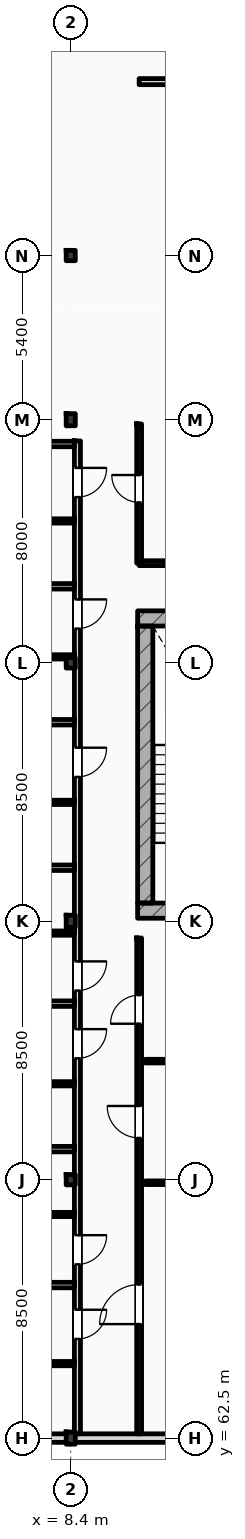
"""IFC4 building model, lengths in metres.
Left out: names, types, materials, properties, quantities, classifications, styles, units other than length and angle.
Written with IfcOpenShell. Run it as: python <this file> out.ifc"""

import sys

from ifc_helpers import new_model, si_unit, direction, frame, frame_2d, origin, origin_2d, place, context, subcontext, project, spatial, rectangle, i_section, extrude, element, fill, save


model = new_model("IFC4")
c1 = context("Model", 3, precision=1e-05, world=origin(), true_north=direction((0.0, 1.0)))
c2 = subcontext(c1, "Body", "Model", "MODEL_VIEW")
j1 = project(units=[si_unit("LENGTHUNIT", "METRE"), si_unit("PLANEANGLEUNIT", "RADIAN")], contexts=[c1])
p1 = place(None, origin())
s1 = spatial("IfcSite", under=j1, at=p1, CompositionType="ELEMENT")
p2 = place(p1, origin())
s2 = spatial("IfcBuilding", under=s1, at=p2, CompositionType="ELEMENT")
p3 = place(p2, frame((0.0, 0.0, 39.0)))
s3 = spatial("IfcBuildingStorey", under=s2, at=p3, CompositionType="ELEMENT", Elevation=39.0)
p4 = place(p3, frame((8.4, 62.5, 0.0), z_axis=(0.0, 0.0, 1.0), x_axis=(1.0, 0.0, 0.0)))
e1 = element("IfcColumn", 1, at=p4, inside=s3, PredefinedType="COLUMN", context=c2, shape_type="SweptSolid", body=[
    extrude(i_section(OverallWidth=0.3, OverallDepth=0.4, WebThickness=0.013, FlangeThickness=0.024, FilletRadius=0.027, at=origin_2d()), origin(), (0.0, 0.0, 1.0), 3.6),
])
p5 = place(p3, frame((8.4, 71.0, 0.0), z_axis=(0.0, 0.0, 1.0), x_axis=(1.0, 0.0, 0.0)))
e2 = element("IfcColumn", 2, at=p5, inside=s3, PredefinedType="COLUMN", context=c2, shape_type="SweptSolid", body=[
    extrude(i_section(OverallWidth=0.3, OverallDepth=0.34, WebThickness=0.012, FlangeThickness=0.021, FilletRadius=0.027, at=origin_2d()), origin(), (0.0, 0.0, 1.0), 3.6),
])
p6 = place(p3, frame((8.4, 79.5, 0.0), z_axis=(0.0, 0.0, 1.0), x_axis=(1.0, 0.0, 0.0)))
e3 = element("IfcColumn", 3, at=p6, inside=s3, PredefinedType="COLUMN", context=c2, shape_type="SweptSolid", body=[
    extrude(i_section(OverallWidth=0.3, OverallDepth=0.4, WebThickness=0.013, FlangeThickness=0.024, FilletRadius=0.027, at=origin_2d()), origin(), (0.0, 0.0, 1.0), 3.6),
])
p7 = place(p3, frame((8.4, 88.0, 0.0), z_axis=(0.0, 0.0, 1.0), x_axis=(1.0, 0.0, 0.0)))
e4 = element("IfcColumn", 4, at=p7, inside=s3, PredefinedType="COLUMN", context=c2, shape_type="SweptSolid", body=[
    extrude(i_section(OverallWidth=0.3, OverallDepth=0.34, WebThickness=0.012, FlangeThickness=0.021, FilletRadius=0.027, at=origin_2d()), origin(), (0.0, 0.0, 1.0), 3.6),
])
p8 = place(p3, frame((8.4, 96.0, 0.0), z_axis=(0.0, 0.0, 1.0), x_axis=(1.0, 0.0, 0.0)))
e5 = element("IfcColumn", 5, at=p8, inside=s3, PredefinedType="COLUMN", context=c2, shape_type="SweptSolid", body=[
    extrude(i_section(OverallWidth=0.3, OverallDepth=0.4, WebThickness=0.013, FlangeThickness=0.024, FilletRadius=0.027, at=origin_2d()), origin(), (0.0, 0.0, 1.0), 3.6),
])
p9 = place(p3, frame((8.4, 101.4, 0.0), z_axis=(0.0, 0.0, 1.0), x_axis=(1.0, 0.0, 0.0)))
e6 = element("IfcColumn", 6, at=p9, inside=s3, PredefinedType="COLUMN", context=c2, shape_type="SweptSolid", body=[
    extrude(i_section(OverallWidth=0.3, OverallDepth=0.34, WebThickness=0.012, FlangeThickness=0.021, FilletRadius=0.027, at=origin_2d()), origin(), (0.0, 0.0, 1.0), 3.6),
])
for number, where, z_axis, x_axis in (
    (7, (10.6, 89.462, 0.0), (0.0, 0.0, 1.0), (1.0, 0.0, 0.0)),
    (8, (10.6, 79.85, 0.0), (0.0, 0.0, 1.0), (1.0, 0.0, 0.0)),
):
    element("IfcWall", number, at=place(p3, frame(where, z_axis=z_axis, x_axis=x_axis)), inside=s3, PredefinedType="SHEAR", context=c2, shape_type="SweptSolid", body=[
        extrude(rectangle(XDim=5.16, YDim=0.5, at=frame_2d((2.58, 0.0))), origin(), (0.0, 0.0, 1.0), 3.6),
    ])
p10 = place(p3, frame((10.85, 80.1, 0.0), z_axis=(0.0, 0.0, 1.0), x_axis=(0.0, 1.0, 0.0)))
e9 = element("IfcWall", 9, at=p10, inside=s3, PredefinedType="SHEAR", context=c2, shape_type="SweptSolid", body=[
    extrude(rectangle(XDim=9.112, YDim=0.5, at=frame_2d((4.556, 0.0))), origin(), (0.0, 0.0, 1.0), 3.6),
])
p11 = place(p3, frame((0.0, 62.5, 0.0), z_axis=(0.0, 0.0, 1.0), x_axis=(1.0, 0.0, 0.0)))
e10 = element("IfcWall", 10, at=p11, inside=s3, PredefinedType="STANDARD", context=c2, shape_type="SweptSolid", body=[
    extrude(rectangle(XDim=25.2, YDim=0.28, at=frame_2d((12.6, 0.0))), origin(), (0.0, 0.0, 1.0), 2.72),
])
p12 = place(p3, frame((10.65, 107.12, 0.0), z_axis=(0.0, 0.0, 1.0), x_axis=(1.0, 0.0, 0.0)))
e11 = element("IfcWall", 11, at=p12, inside=s3, PredefinedType="PARTITIONING", context=c2, shape_type="SweptSolid", body=[
    extrude(rectangle(XDim=14.8, YDim=0.2, at=frame_2d((7.4, 0.0))), origin(), (0.0, 0.0, 1.0), 3.38),
])
p13 = place(p12, frame((8.5, 0.0, 0.0)))
e12 = element("IfcOpeningElement", 12, at=p13, cuts=e11, PredefinedType="OPENING", context=c2, shape_type="SweptSolid", body=[
    extrude(rectangle(XDim=1.25, YDim=2.15, at=frame_2d((0.625, 1.075))), frame((0.0, 0.11, 0.0), z_axis=(0.0, -1.0, 0.0), x_axis=(1.0, 0.0, 0.0)), (0.0, 0.0, 1.0), 0.22),
])
p14 = place(p3, frame((8.62, 62.64, 0.0), z_axis=(0.0, 0.0, 1.0), x_axis=(0.0, 1.0, 0.0)))
e13 = element("IfcWall", 13, at=p14, inside=s3, PredefinedType="PARTITIONING", context=c2, shape_type="SweptSolid", body=[
    extrude(rectangle(XDim=32.66, YDim=0.2, at=frame_2d((16.33, 0.0))), origin(), (0.0, 0.0, 1.0), 2.91),
])
p15 = place(p14, frame((3.122, 0.0, 0.0)))
e14 = element("IfcOpeningElement", 14, at=p15, cuts=e13, PredefinedType="OPENING", context=c2, shape_type="SweptSolid", body=[
    extrude(rectangle(XDim=0.96, YDim=2.2, at=frame_2d((0.48, 1.1))), frame((0.0, 0.11, 0.0), z_axis=(0.0, -1.0, 0.0), x_axis=(1.0, 0.0, 0.0)), (0.0, 0.0, 1.0), 0.22),
])
p16 = place(p14, frame((5.575, 0.0, 0.0)))
e15 = element("IfcOpeningElement", 15, at=p16, cuts=e13, PredefinedType="OPENING", context=c2, shape_type="SweptSolid", body=[
    extrude(rectangle(XDim=0.96, YDim=2.2, at=frame_2d((0.48, 1.1))), frame((0.0, 0.11, 0.0), z_axis=(0.0, -1.0, 0.0), x_axis=(1.0, 0.0, 0.0)), (0.0, 0.0, 1.0), 0.22),
])
p17 = place(p14, frame((12.353, 0.0, 0.0)))
e16 = element("IfcOpeningElement", 16, at=p17, cuts=e13, PredefinedType="OPENING", context=c2, shape_type="SweptSolid", body=[
    extrude(rectangle(XDim=0.96, YDim=2.2, at=frame_2d((0.48, 1.1))), frame((0.0, 0.11, 0.0), z_axis=(0.0, -1.0, 0.0), x_axis=(1.0, 0.0, 0.0)), (0.0, 0.0, 1.0), 0.22),
])
p18 = place(p14, frame((14.581, 0.0, 0.0)))
e17 = element("IfcOpeningElement", 17, at=p18, cuts=e13, PredefinedType="OPENING", context=c2, shape_type="SweptSolid", body=[
    extrude(rectangle(XDim=0.96, YDim=2.2, at=frame_2d((0.48, 1.1))), frame((0.0, 0.11, 0.0), z_axis=(0.0, -1.0, 0.0), x_axis=(1.0, 0.0, 0.0)), (0.0, 0.0, 1.0), 0.22),
])
p19 = place(p14, frame((21.61, 0.0, 0.0)))
e18 = element("IfcOpeningElement", 18, at=p19, cuts=e13, PredefinedType="OPENING", context=c2, shape_type="SweptSolid", body=[
    extrude(rectangle(XDim=0.96, YDim=2.2, at=frame_2d((0.48, 1.1))), frame((0.0, 0.11, 0.0), z_axis=(0.0, -1.0, 0.0), x_axis=(1.0, 0.0, 0.0)), (0.0, 0.0, 1.0), 0.22),
])
p20 = place(p14, frame((26.488, 0.0, 0.0)))
e19 = element("IfcOpeningElement", 19, at=p20, cuts=e13, PredefinedType="OPENING", context=c2, shape_type="SweptSolid", body=[
    extrude(rectangle(XDim=0.96, YDim=2.2, at=frame_2d((0.48, 1.1))), frame((0.0, 0.11, 0.0), z_axis=(0.0, -1.0, 0.0), x_axis=(1.0, 0.0, 0.0)), (0.0, 0.0, 1.0), 0.22),
])
p21 = place(p14, frame((30.814, 0.0, 0.0)))
e20 = element("IfcOpeningElement", 20, at=p21, cuts=e13, PredefinedType="OPENING", context=c2, shape_type="SweptSolid", body=[
    extrude(rectangle(XDim=0.96, YDim=2.2, at=frame_2d((0.48, 1.1))), frame((0.0, 0.11, 0.0), z_axis=(0.0, -1.0, 0.0), x_axis=(1.0, 0.0, 0.0)), (0.0, 0.0, 1.0), 0.22),
])
p22 = place(p3, frame((10.65, 62.64, 0.0), z_axis=(0.0, 0.0, 1.0), x_axis=(0.0, 1.0, 0.0)))
e21 = element("IfcWall", 21, at=p22, inside=s3, PredefinedType="PARTITIONING", context=c2, shape_type="SweptSolid", body=[
    extrude(rectangle(XDim=16.31, YDim=0.16, at=frame_2d((8.155, 0.0))), origin(), (0.0, 0.0, 1.0), 3.38),
])
p23 = place(p22, frame((3.61, 0.0, 0.0)))
e22 = element("IfcOpeningElement", 22, at=p23, cuts=e21, PredefinedType="OPENING", context=c2, shape_type="SweptSolid", body=[
    extrude(rectangle(XDim=1.3, YDim=2.2, at=frame_2d((0.65, 1.1))), frame((0.0, 0.09, 0.0), z_axis=(0.0, -1.0, 0.0), x_axis=(1.0, 0.0, 0.0)), (0.0, 0.0, 1.0), 0.18),
])
p24 = place(p22, frame((9.735, 0.0, 0.0)))
e23 = element("IfcOpeningElement", 23, at=p24, cuts=e21, PredefinedType="OPENING", context=c2, shape_type="SweptSolid", body=[
    extrude(rectangle(XDim=1.05, YDim=2.12, at=frame_2d((0.525, 1.06))), frame((0.0, 0.09, 0.0), z_axis=(0.0, -1.0, 0.0), x_axis=(1.0, 0.0, 0.0)), (0.0, 0.0, 1.0), 0.18),
])
p25 = place(p22, frame((13.49, 0.0, 0.0)))
e24 = element("IfcOpeningElement", 24, at=p25, cuts=e21, PredefinedType="OPENING", context=c2, shape_type="SweptSolid", body=[
    extrude(rectangle(XDim=0.94, YDim=2.15, at=frame_2d((0.47, 1.075))), frame((0.0, 0.09, 0.0), z_axis=(0.0, -1.0, 0.0), x_axis=(1.0, 0.0, 0.0)), (0.0, 0.0, 1.0), 0.18),
])
p26 = place(p3, frame((10.65, 91.28, 0.0), z_axis=(0.0, 0.0, 1.0), x_axis=(0.0, 1.0, 0.0)))
e25 = element("IfcWall", 25, at=p26, inside=s3, PredefinedType="PARTITIONING", context=c2, shape_type="SweptSolid", body=[
    extrude(rectangle(XDim=4.58, YDim=0.16, at=frame_2d((2.29, 0.0))), origin(), (0.0, 0.0, 1.0), 3.38),
])
p27 = place(p26, frame((2.0, 0.0, 0.0)))
e26 = element("IfcOpeningElement", 26, at=p27, cuts=e25, PredefinedType="OPENING", context=c2, shape_type="SweptSolid", body=[
    extrude(rectangle(XDim=0.9, YDim=2.1, at=frame_2d((0.45, 1.05))), frame((0.0, 0.09, 0.0), z_axis=(0.0, -1.0, 0.0), x_axis=(1.0, 0.0, 0.0)), (0.0, 0.0, 1.0), 0.18),
])
p28 = place(p3, frame((10.65, 91.28, 0.0), z_axis=(0.0, 0.0, 1.0), x_axis=(1.0, 0.0, 0.0)))
e27 = element("IfcWall", 27, at=p28, inside=s3, PredefinedType="PARTITIONING", context=c2, shape_type="SweptSolid", body=[
    extrude(rectangle(XDim=6.9, YDim=0.16, at=frame_2d((3.45, 0.0))), origin(), (0.0, 0.0, 1.0), 3.38),
])
p29 = place(p3, frame((0.15, 67.534, 0.0), z_axis=(0.0, 0.0, 1.0), x_axis=(1.0, 0.0, 0.0)))
e28 = element("IfcWall", 28, at=p29, inside=s3, PredefinedType="PARTITIONING", context=c2, shape_type="SweptSolid", body=[
    extrude(rectangle(XDim=8.37, YDim=0.18, at=frame_2d((4.185, 0.0))), origin(), (0.0, 0.0, 1.0), 3.38),
])
p30 = place(p3, frame((5.05, 64.95, 0.0), z_axis=(0.0, 0.0, 1.0), x_axis=(1.0, 0.0, 0.0)))
e29 = element("IfcWall", 29, at=p30, inside=s3, PredefinedType="PARTITIONING", context=c2, shape_type="SweptSolid", body=[
    extrude(rectangle(XDim=3.47, YDim=0.14, at=frame_2d((1.735, 0.0))), origin(), (0.0, 0.0, 1.0), 3.38),
])
p31 = place(p3, frame((0.15, 72.005, 0.0), z_axis=(0.0, 0.0, 1.0), x_axis=(1.0, 0.0, 0.0)))
e30 = element("IfcWall", 30, at=p31, inside=s3, PredefinedType="PARTITIONING", context=c2, shape_type="SweptSolid", body=[
    extrude(rectangle(XDim=8.37, YDim=0.18, at=frame_2d((4.185, 0.0))), origin(), (0.0, 0.0, 1.0), 3.38),
])
p32 = place(p3, frame((5.05, 69.855, 0.0), z_axis=(0.0, 0.0, 1.0), x_axis=(1.0, 0.0, 0.0)))
e31 = element("IfcWall", 31, at=p32, inside=s3, PredefinedType="PARTITIONING", context=c2, shape_type="SweptSolid", body=[
    extrude(rectangle(XDim=3.47, YDim=0.14, at=frame_2d((1.735, 0.0))), origin(), (0.0, 0.0, 1.0), 3.38),
])
p33 = place(p3, frame((0.15, 76.791, 0.0), z_axis=(0.0, 0.0, 1.0), x_axis=(1.0, 0.0, 0.0)))
e32 = element("IfcWall", 32, at=p33, inside=s3, PredefinedType="PARTITIONING", context=c2, shape_type="SweptSolid", body=[
    extrude(rectangle(XDim=8.37, YDim=0.18, at=frame_2d((4.185, 0.0))), origin(), (0.0, 0.0, 1.0), 3.38),
])
p34 = place(p3, frame((5.05, 74.155, 0.0), z_axis=(0.0, 0.0, 1.0), x_axis=(1.0, 0.0, 0.0)))
e33 = element("IfcWall", 33, at=p34, inside=s3, PredefinedType="PARTITIONING", context=c2, shape_type="SweptSolid", body=[
    extrude(rectangle(XDim=3.47, YDim=0.14, at=frame_2d((1.735, 0.0))), origin(), (0.0, 0.0, 1.0), 3.38),
])
p35 = place(p3, frame((0.15, 81.262, 0.0), z_axis=(0.0, 0.0, 1.0), x_axis=(1.0, 0.0, 0.0)))
e34 = element("IfcWall", 34, at=p35, inside=s3, PredefinedType="PARTITIONING", context=c2, shape_type="SweptSolid", body=[
    extrude(rectangle(XDim=8.37, YDim=0.18, at=frame_2d((4.185, 0.0))), origin(), (0.0, 0.0, 1.0), 3.38),
])
p36 = place(p3, frame((5.05, 79.112, 0.0), z_axis=(0.0, 0.0, 1.0), x_axis=(1.0, 0.0, 0.0)))
e35 = element("IfcWall", 35, at=p36, inside=s3, PredefinedType="PARTITIONING", context=c2, shape_type="SweptSolid", body=[
    extrude(rectangle(XDim=3.47, YDim=0.14, at=frame_2d((1.735, 0.0))), origin(), (0.0, 0.0, 1.0), 3.38),
])
p37 = place(p3, frame((0.15, 86.048, 0.0), z_axis=(0.0, 0.0, 1.0), x_axis=(1.0, 0.0, 0.0)))
e36 = element("IfcWall", 36, at=p37, inside=s3, PredefinedType="PARTITIONING", context=c2, shape_type="SweptSolid", body=[
    extrude(rectangle(XDim=8.37, YDim=0.18, at=frame_2d((4.185, 0.0))), origin(), (0.0, 0.0, 1.0), 3.38),
])
p38 = place(p3, frame((5.05, 83.412, 0.0), z_axis=(0.0, 0.0, 1.0), x_axis=(1.0, 0.0, 0.0)))
e37 = element("IfcWall", 37, at=p38, inside=s3, PredefinedType="PARTITIONING", context=c2, shape_type="SweptSolid", body=[
    extrude(rectangle(XDim=3.47, YDim=0.14, at=frame_2d((1.735, 0.0))), origin(), (0.0, 0.0, 1.0), 3.38),
])
p39 = place(p3, frame((0.15, 90.519, 0.0), z_axis=(0.0, 0.0, 1.0), x_axis=(1.0, 0.0, 0.0)))
e38 = element("IfcWall", 38, at=p39, inside=s3, PredefinedType="PARTITIONING", context=c2, shape_type="SweptSolid", body=[
    extrude(rectangle(XDim=8.37, YDim=0.18, at=frame_2d((4.185, 0.0))), origin(), (0.0, 0.0, 1.0), 3.38),
])
p40 = place(p3, frame((5.05, 88.198, 0.0), z_axis=(0.0, 0.0, 1.0), x_axis=(1.0, 0.0, 0.0)))
e39 = element("IfcWall", 39, at=p40, inside=s3, PredefinedType="PARTITIONING", context=c2, shape_type="SweptSolid", body=[
    extrude(rectangle(XDim=3.47, YDim=0.14, at=frame_2d((1.735, 0.0))), origin(), (0.0, 0.0, 1.0), 2.82),
])
p41 = place(p3, frame((0.15, 95.2, 0.0), z_axis=(0.0, 0.0, 1.0), x_axis=(1.0, 0.0, 0.0)))
e40 = element("IfcWall", 40, at=p41, inside=s3, PredefinedType="PARTITIONING", context=c2, shape_type="SweptSolid", body=[
    extrude(rectangle(XDim=8.37, YDim=0.18, at=frame_2d((4.185, 0.0))), origin(), (0.0, 0.0, 1.0), 3.38),
])
p42 = place(p3, frame((5.05, 92.669, 0.0), z_axis=(0.0, 0.0, 1.0), x_axis=(1.0, 0.0, 0.0)))
e41 = element("IfcWall", 41, at=p42, inside=s3, PredefinedType="PARTITIONING", context=c2, shape_type="SweptSolid", body=[
    extrude(rectangle(XDim=3.47, YDim=0.14, at=frame_2d((1.735, 0.0))), origin(), (0.0, 0.0, 1.0), 3.38),
])
p43 = place(p3, frame((10.85, 70.9, 0.0), z_axis=(0.0, 0.0, 1.0), x_axis=(1.0, 0.0, 0.0)))
e42 = element("IfcWall", 42, at=p43, inside=s3, PredefinedType="PARTITIONING", context=c2, shape_type="SweptSolid", body=[
    extrude(rectangle(XDim=7.35, YDim=0.12, at=frame_2d((3.675, 0.0))), origin(), (0.0, 0.0, 1.0), 2.72),
])
p44 = place(p3, frame((10.85, 74.9, 0.0), z_axis=(0.0, 0.0, 1.0), x_axis=(1.0, 0.0, 0.0)))
e43 = element("IfcWall", 43, at=p44, inside=s3, PredefinedType="PARTITIONING", context=c2, shape_type="SweptSolid", body=[
    extrude(rectangle(XDim=5.35, YDim=0.12, at=frame_2d((2.675, 0.0))), origin(), (0.0, 0.0, 1.0), 3.38),
])
p45 = place(p15, frame((0.96, 0.0, 0.0), z_axis=(0.0, 0.0, 1.0), x_axis=(-1.0, 0.0, 0.0)))
e44 = element("IfcDoor", 44, at=p45, inside=s3, OperationType="SINGLE_SWING_RIGHT", PredefinedType="DOOR", context=c2, shape_type="SweptSolid", body=[
    extrude(rectangle(XDim=0.96, YDim=2.2, at=frame_2d((0.48, 1.1))), frame((0.0, 0.025, 0.0), z_axis=(0.0, -1.0, 0.0), x_axis=(1.0, 0.0, 0.0)), (0.0, 0.0, 1.0), 0.05),
])
fill(e14, e44)
p46 = place(p16, frame((0.96, 0.0, 0.0), z_axis=(0.0, 0.0, 1.0), x_axis=(-1.0, 0.0, 0.0)))
e45 = element("IfcDoor", 45, at=p46, inside=s3, OperationType="SINGLE_SWING_RIGHT", PredefinedType="DOOR", context=c2, shape_type="SweptSolid", body=[
    extrude(rectangle(XDim=0.96, YDim=2.2, at=frame_2d((0.48, 1.1))), frame((0.0, 0.025, 0.0), z_axis=(0.0, -1.0, 0.0), x_axis=(1.0, 0.0, 0.0)), (0.0, 0.0, 1.0), 0.05),
])
fill(e15, e45)
p47 = place(p17, frame((0.96, 0.0, 0.0), z_axis=(0.0, 0.0, 1.0), x_axis=(-1.0, 0.0, 0.0)))
e46 = element("IfcDoor", 46, at=p47, inside=s3, OperationType="SINGLE_SWING_RIGHT", PredefinedType="DOOR", context=c2, shape_type="SweptSolid", body=[
    extrude(rectangle(XDim=0.96, YDim=2.2, at=frame_2d((0.48, 1.1))), frame((0.0, 0.025, 0.0), z_axis=(0.0, -1.0, 0.0), x_axis=(1.0, 0.0, 0.0)), (0.0, 0.0, 1.0), 0.05),
])
fill(e16, e46)
p48 = place(p18, frame((0.96, 0.0, 0.0), z_axis=(0.0, 0.0, 1.0), x_axis=(-1.0, 0.0, 0.0)))
e47 = element("IfcDoor", 47, at=p48, inside=s3, OperationType="SINGLE_SWING_RIGHT", PredefinedType="DOOR", context=c2, shape_type="SweptSolid", body=[
    extrude(rectangle(XDim=0.96, YDim=2.2, at=frame_2d((0.48, 1.1))), frame((0.0, 0.025, 0.0), z_axis=(0.0, -1.0, 0.0), x_axis=(1.0, 0.0, 0.0)), (0.0, 0.0, 1.0), 0.05),
])
fill(e17, e47)
p49 = place(p19, frame((0.96, 0.0, 0.0), z_axis=(0.0, 0.0, 1.0), x_axis=(-1.0, 0.0, 0.0)))
e48 = element("IfcDoor", 48, at=p49, inside=s3, OperationType="SINGLE_SWING_RIGHT", PredefinedType="DOOR", context=c2, shape_type="SweptSolid", body=[
    extrude(rectangle(XDim=0.96, YDim=2.2, at=frame_2d((0.48, 1.1))), frame((0.0, 0.025, 0.0), z_axis=(0.0, -1.0, 0.0), x_axis=(1.0, 0.0, 0.0)), (0.0, 0.0, 1.0), 0.05),
])
fill(e18, e48)
p50 = place(p20, frame((0.96, 0.0, 0.0), z_axis=(0.0, 0.0, 1.0), x_axis=(-1.0, 0.0, 0.0)))
e49 = element("IfcDoor", 49, at=p50, inside=s3, OperationType="SINGLE_SWING_RIGHT", PredefinedType="DOOR", context=c2, shape_type="SweptSolid", body=[
    extrude(rectangle(XDim=0.96, YDim=2.2, at=frame_2d((0.48, 1.1))), frame((0.0, 0.025, 0.0), z_axis=(0.0, -1.0, 0.0), x_axis=(1.0, 0.0, 0.0)), (0.0, 0.0, 1.0), 0.05),
])
fill(e19, e49)
p51 = place(p21, frame((0.96, 0.0, 0.0), z_axis=(0.0, 0.0, 1.0), x_axis=(-1.0, 0.0, 0.0)))
e50 = element("IfcDoor", 50, at=p51, inside=s3, OperationType="SINGLE_SWING_RIGHT", PredefinedType="DOOR", context=c2, shape_type="SweptSolid", body=[
    extrude(rectangle(XDim=0.96, YDim=2.2, at=frame_2d((0.48, 1.1))), frame((0.0, 0.025, 0.0), z_axis=(0.0, -1.0, 0.0), x_axis=(1.0, 0.0, 0.0)), (0.0, 0.0, 1.0), 0.05),
])
fill(e20, e50)
p52 = place(p23, origin())
e51 = element("IfcDoor", 51, at=p52, inside=s3, OperationType="SINGLE_SWING_LEFT", PredefinedType="DOOR", context=c2, shape_type="SweptSolid", body=[
    extrude(rectangle(XDim=1.3, YDim=2.2, at=frame_2d((0.65, 1.1))), frame((0.0, 0.025, 0.0), z_axis=(0.0, -1.0, 0.0), x_axis=(1.0, 0.0, 0.0)), (0.0, 0.0, 1.0), 0.05),
])
fill(e22, e51)
p53 = place(p24, origin())
e52 = element("IfcDoor", 52, at=p53, inside=s3, OperationType="SINGLE_SWING_RIGHT", PredefinedType="DOOR", context=c2, shape_type="SweptSolid", body=[
    extrude(rectangle(XDim=1.05, YDim=2.12, at=frame_2d((0.525, 1.06))), frame((0.0, 0.025, 0.0), z_axis=(0.0, -1.0, 0.0), x_axis=(1.0, 0.0, 0.0)), (0.0, 0.0, 1.0), 0.05),
])
fill(e23, e52)
p54 = place(p25, origin())
e53 = element("IfcDoor", 53, at=p54, inside=s3, OperationType="SINGLE_SWING_LEFT", PredefinedType="DOOR", context=c2, shape_type="SweptSolid", body=[
    extrude(rectangle(XDim=0.94, YDim=2.15, at=frame_2d((0.47, 1.075))), frame((0.0, 0.025, 0.0), z_axis=(0.0, -1.0, 0.0), x_axis=(1.0, 0.0, 0.0)), (0.0, 0.0, 1.0), 0.05),
])
fill(e24, e53)
p55 = place(p27, origin())
e54 = element("IfcDoor", 54, at=p55, inside=s3, OperationType="SINGLE_SWING_RIGHT", PredefinedType="DOOR", context=c2, shape_type="SweptSolid", body=[
    extrude(rectangle(XDim=0.9, YDim=2.1, at=frame_2d((0.45, 1.05))), frame((0.0, 0.025, 0.0), z_axis=(0.0, -1.0, 0.0), x_axis=(1.0, 0.0, 0.0)), (0.0, 0.0, 1.0), 0.05),
])
fill(e26, e54)
save(model, sys.argv[1])
